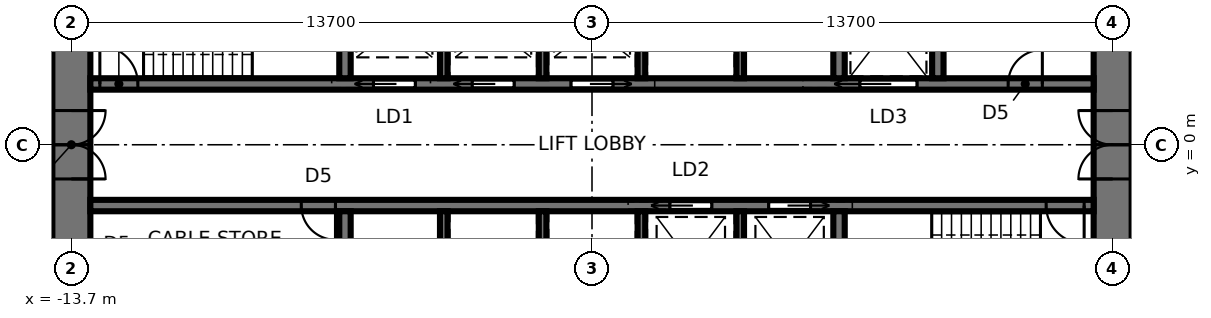
"""IFC4 building model, lengths in metres.
Left out: names, types, materials, properties, quantities, classifications, styles, units other than length and angle.
Written with IfcOpenShell. Run it as: python <this file> out.ifc"""

import sys

from ifc_helpers import new_model, si_unit, direction, frame, frame_2d, origin, place, context, subcontext, project, spatial, rectangle, extrude, element, fill, save


model = new_model("IFC4")
c1 = context("Model", 3, precision=1e-05, world=origin(), true_north=direction((0.0, 1.0)))
c2 = subcontext(c1, "Body", "Model", "MODEL_VIEW")
j1 = project(units=[si_unit("LENGTHUNIT", "METRE"), si_unit("PLANEANGLEUNIT", "RADIAN")], contexts=[c1])
p1 = place(None, origin())
s1 = spatial("IfcSite", under=j1, at=p1, CompositionType="ELEMENT")
p2 = place(p1, origin())
s2 = spatial("IfcBuilding", under=s1, at=p2, CompositionType="ELEMENT")
p3 = place(p2, frame((0.0, 0.0, 32.2)))
s3 = spatial("IfcBuildingStorey", under=s2, at=p3, CompositionType="ELEMENT", Elevation=32.2)
p4 = place(p3, frame((13.7, -9.5, 0.0), z_axis=(0.0, 0.0, 1.0), x_axis=(0.0, 1.0, 0.0)))
e1 = element("IfcWall", 1, at=p4, inside=s3, PredefinedType="SHEAR", context=c2, shape_type="SweptSolid", body=[
    extrude(rectangle(XDim=19.0, YDim=1.0, at=frame_2d((9.5, 0.0))), origin(), (0.0, 0.0, 1.0), 4.2),
])
p5 = place(p4, frame((8.6, 0.0, 0.0)))
e2 = element("IfcOpeningElement", 2, at=p5, cuts=e1, PredefinedType="OPENING", context=c2, shape_type="SweptSolid", body=[
    extrude(rectangle(XDim=1.8, YDim=2.4, at=frame_2d((0.9, 1.2))), frame((0.0, 0.51, 0.0), z_axis=(0.0, -1.0, 0.0), x_axis=(1.0, 0.0, 0.0)), (0.0, 0.0, 1.0), 1.02),
])
p6 = place(p3, frame((-13.7, 9.5, 0.0), z_axis=(0.0, 0.0, 1.0), x_axis=(0.0, -1.0, 0.0)))
e3 = element("IfcWall", 3, at=p6, inside=s3, PredefinedType="SHEAR", context=c2, shape_type="SweptSolid", body=[
    extrude(rectangle(XDim=19.0, YDim=1.0, at=frame_2d((9.5, 0.0))), origin(), (0.0, 0.0, 1.0), 4.2),
])
p7 = place(p6, frame((8.6, 0.0, 0.0)))
e4 = element("IfcOpeningElement", 4, at=p7, cuts=e3, PredefinedType="OPENING", context=c2, shape_type="SweptSolid", body=[
    extrude(rectangle(XDim=1.8, YDim=2.4, at=frame_2d((0.9, 1.2))), frame((0.0, 0.51, 0.0), z_axis=(0.0, -1.0, 0.0), x_axis=(1.0, 0.0, 0.0)), (0.0, 0.0, 1.0), 1.02),
])
p8 = place(p3, frame((-13.2, 1.6, 0.0), z_axis=(0.0, 0.0, 1.0), x_axis=(1.0, 0.0, 0.0)))
e5 = element("IfcWall", 5, at=p8, inside=s3, PredefinedType="SHEAR", context=c2, shape_type="SweptSolid", body=[
    extrude(rectangle(XDim=26.4, YDim=0.3, at=frame_2d((13.2, 0.0))), origin(), (0.0, 0.0, 1.0), 4.2),
])
p9 = place(p8, frame((0.25, 0.0, 0.0)))
e6 = element("IfcOpeningElement", 6, at=p9, cuts=e5, PredefinedType="OPENING", context=c2, shape_type="SweptSolid", body=[
    extrude(rectangle(XDim=1.0, YDim=2.1, at=frame_2d((0.5, 1.05))), frame((0.0, 0.16, 0.0), z_axis=(0.0, -1.0, 0.0), x_axis=(1.0, 0.0, 0.0)), (0.0, 0.0, 1.0), 0.32),
])
p10 = place(p8, frame((20.25, 0.0, 0.0)))
e7 = element("IfcOpeningElement", 7, at=p10, cuts=e5, PredefinedType="OPENING", context=c2, shape_type="SweptSolid", body=[
    extrude(rectangle(XDim=1.5, YDim=2.4, at=frame_2d((0.75, 1.2))), frame((0.0, 0.16, 0.0), z_axis=(0.0, -1.0, 0.0), x_axis=(1.0, 0.0, 0.0)), (0.0, 0.0, 1.0), 0.32),
])
p11 = place(p8, frame((7.45, 0.0, 0.0)))
e8 = element("IfcOpeningElement", 8, at=p11, cuts=e5, PredefinedType="OPENING", context=c2, shape_type="SweptSolid", body=[
    extrude(rectangle(XDim=1.1, YDim=2.3, at=frame_2d((0.55, 1.15))), frame((0.0, 0.16, 0.0), z_axis=(0.0, -1.0, 0.0), x_axis=(1.0, 0.0, 0.0)), (0.0, 0.0, 1.0), 0.32),
])
p12 = place(p8, frame((10.05, 0.0, 0.0)))
e9 = element("IfcOpeningElement", 9, at=p12, cuts=e5, PredefinedType="OPENING", context=c2, shape_type="SweptSolid", body=[
    extrude(rectangle(XDim=1.1, YDim=2.3, at=frame_2d((0.55, 1.15))), frame((0.0, 0.16, 0.0), z_axis=(0.0, -1.0, 0.0), x_axis=(1.0, 0.0, 0.0)), (0.0, 0.0, 1.0), 0.32),
])
p13 = place(p8, frame((12.65, 0.0, 0.0)))
e10 = element("IfcOpeningElement", 10, at=p13, cuts=e5, PredefinedType="OPENING", context=c2, shape_type="SweptSolid", body=[
    extrude(rectangle(XDim=1.1, YDim=2.3, at=frame_2d((0.55, 1.15))), frame((0.0, 0.16, 0.0), z_axis=(0.0, -1.0, 0.0), x_axis=(1.0, 0.0, 0.0)), (0.0, 0.0, 1.0), 0.32),
])
p14 = place(p8, frame((24.15, 0.0, 0.0)))
e11 = element("IfcOpeningElement", 11, at=p14, cuts=e5, PredefinedType="OPENING", context=c2, shape_type="SweptSolid", body=[
    extrude(rectangle(XDim=0.9, YDim=2.1, at=frame_2d((0.45, 1.05))), frame((0.0, 0.16, 0.0), z_axis=(0.0, -1.0, 0.0), x_axis=(1.0, 0.0, 0.0)), (0.0, 0.0, 1.0), 0.32),
])
p15 = place(p3, frame((-13.2, -1.6, 0.0), z_axis=(0.0, 0.0, 1.0), x_axis=(1.0, 0.0, 0.0)))
e12 = element("IfcWall", 12, at=p15, inside=s3, PredefinedType="SHEAR", context=c2, shape_type="SweptSolid", body=[
    extrude(rectangle(XDim=26.4, YDim=0.3, at=frame_2d((13.2, 0.0))), origin(), (0.0, 0.0, 1.0), 4.2),
])
p16 = place(p15, frame((25.15, 0.0, 0.0)))
e13 = element("IfcOpeningElement", 13, at=p16, cuts=e12, PredefinedType="OPENING", context=c2, shape_type="SweptSolid", body=[
    extrude(rectangle(XDim=1.0, YDim=2.1, at=frame_2d((0.5, 1.05))), frame((0.0, 0.16, 0.0), z_axis=(0.0, -1.0, 0.0), x_axis=(1.0, 0.0, 0.0)), (0.0, 0.0, 1.0), 0.32),
])
p17 = place(p15, frame((15.25, 0.0, 0.0)))
e14 = element("IfcOpeningElement", 14, at=p17, cuts=e12, PredefinedType="OPENING", context=c2, shape_type="SweptSolid", body=[
    extrude(rectangle(XDim=1.1, YDim=2.3, at=frame_2d((0.55, 1.15))), frame((0.0, 0.16, 0.0), z_axis=(0.0, -1.0, 0.0), x_axis=(1.0, 0.0, 0.0)), (0.0, 0.0, 1.0), 0.32),
])
p18 = place(p15, frame((17.85, 0.0, 0.0)))
e15 = element("IfcOpeningElement", 15, at=p18, cuts=e12, PredefinedType="OPENING", context=c2, shape_type="SweptSolid", body=[
    extrude(rectangle(XDim=1.1, YDim=2.3, at=frame_2d((0.55, 1.15))), frame((0.0, 0.16, 0.0), z_axis=(0.0, -1.0, 0.0), x_axis=(1.0, 0.0, 0.0)), (0.0, 0.0, 1.0), 0.32),
])
p19 = place(p15, frame((5.55, 0.0, 0.0)))
e16 = element("IfcOpeningElement", 16, at=p19, cuts=e12, PredefinedType="OPENING", context=c2, shape_type="SweptSolid", body=[
    extrude(rectangle(XDim=0.9, YDim=2.1, at=frame_2d((0.45, 1.05))), frame((0.0, 0.16, 0.0), z_axis=(0.0, -1.0, 0.0), x_axis=(1.0, 0.0, 0.0)), (0.0, 0.0, 1.0), 0.32),
])
for number, where, z_axis, x_axis in (
    (17, (-6.5, 1.75, 0.0), (0.0, 0.0, 1.0), (0.0, 1.0, 0.0)),
    (18, (6.5, 1.75, 0.0), (0.0, 0.0, 1.0), (0.0, 1.0, 0.0)),
):
    element("IfcWall", number, at=place(p3, frame(where, z_axis=z_axis, x_axis=x_axis)), inside=s3, PredefinedType="SHEAR", context=c2, shape_type="SweptSolid", body=[
        extrude(rectangle(XDim=2.7, YDim=0.3, at=frame_2d((1.35, 0.0))), origin(), (0.0, 0.0, 1.0), 4.2),
    ])
for number, where, z_axis, x_axis in (
    (19, (-3.9, 1.75, 0.0), (0.0, 0.0, 1.0), (0.0, 1.0, 0.0)),
    (20, (-1.3, 1.75, 0.0), (0.0, 0.0, 1.0), (0.0, 1.0, 0.0)),
    (21, (1.3, 1.75, 0.0), (0.0, 0.0, 1.0), (0.0, 1.0, 0.0)),
    (22, (3.9, 1.75, 0.0), (0.0, 0.0, 1.0), (0.0, 1.0, 0.0)),
):
    element("IfcWall", number, at=place(p3, frame(where, z_axis=z_axis, x_axis=x_axis)), inside=s3, PredefinedType="SHEAR", context=c2, shape_type="SweptSolid", body=[
        extrude(rectangle(XDim=2.7, YDim=0.2, at=frame_2d((1.35, 0.0))), origin(), (0.0, 0.0, 1.0), 4.2),
    ])
for number, where, z_axis, x_axis in (
    (23, (-6.5, -1.75, 0.0), (0.0, 0.0, 1.0), (0.0, -1.0, 0.0)),
    (24, (6.5, -1.75, 0.0), (0.0, 0.0, 1.0), (0.0, -1.0, 0.0)),
):
    element("IfcWall", number, at=place(p3, frame(where, z_axis=z_axis, x_axis=x_axis)), inside=s3, PredefinedType="SHEAR", context=c2, shape_type="SweptSolid", body=[
        extrude(rectangle(XDim=2.7, YDim=0.3, at=frame_2d((1.35, 0.0))), origin(), (0.0, 0.0, 1.0), 4.2),
    ])
for number, where, z_axis, x_axis in (
    (25, (-3.9, -1.75, 0.0), (0.0, 0.0, 1.0), (0.0, -1.0, 0.0)),
    (26, (-1.3, -1.75, 0.0), (0.0, 0.0, 1.0), (0.0, -1.0, 0.0)),
    (27, (1.3, -1.75, 0.0), (0.0, 0.0, 1.0), (0.0, -1.0, 0.0)),
    (28, (3.9, -1.75, 0.0), (0.0, 0.0, 1.0), (0.0, -1.0, 0.0)),
):
    element("IfcWall", number, at=place(p3, frame(where, z_axis=z_axis, x_axis=x_axis)), inside=s3, PredefinedType="SHEAR", context=c2, shape_type="SweptSolid", body=[
        extrude(rectangle(XDim=2.7, YDim=0.2, at=frame_2d((1.35, 0.0))), origin(), (0.0, 0.0, 1.0), 4.2),
    ])
p20 = place(p3, frame((9.1, 1.75, 0.0), z_axis=(0.0, 0.0, 1.0), x_axis=(0.0, 1.0, 0.0)))
e29 = element("IfcWall", 29, at=p20, inside=s3, PredefinedType="SHEAR", context=c2, shape_type="SweptSolid", body=[
    extrude(rectangle(XDim=2.7, YDim=0.3, at=frame_2d((1.35, 0.0))), origin(), (0.0, 0.0, 1.0), 4.2),
])
p21 = place(p7, origin())
e30 = element("IfcDoor", 30, at=p21, inside=s3, OperationType="DOUBLE_DOOR_SINGLE_SWING", PredefinedType="DOOR", context=c2, shape_type="SweptSolid", body=[
    extrude(rectangle(XDim=1.72, YDim=2.36, at=frame_2d((0.9, 1.18))), frame((0.0, 0.025, 0.0), z_axis=(0.0, -1.0, 0.0), x_axis=(1.0, 0.0, 0.0)), (0.0, 0.0, 1.0), 0.05),
    extrude(rectangle(XDim=0.04, YDim=2.4, at=frame_2d((0.02, 1.2))), frame((0.0, 0.25, 0.0), z_axis=(0.0, -1.0, 0.0), x_axis=(1.0, 0.0, 0.0)), (0.0, 0.0, 1.0), 0.5),
    extrude(rectangle(XDim=0.04, YDim=2.4, at=frame_2d((1.78, 1.2))), frame((0.0, 0.25, 0.0), z_axis=(0.0, -1.0, 0.0), x_axis=(1.0, 0.0, 0.0)), (0.0, 0.0, 1.0), 0.5),
    extrude(rectangle(XDim=1.72, YDim=0.04, at=frame_2d((0.9, 2.38))), frame((0.0, 0.25, 0.0), z_axis=(0.0, -1.0, 0.0), x_axis=(1.0, 0.0, 0.0)), (0.0, 0.0, 1.0), 0.5),
])
fill(e4, e30)
p22 = place(p5, origin())
e31 = element("IfcDoor", 31, at=p22, inside=s3, OperationType="DOUBLE_DOOR_SINGLE_SWING", PredefinedType="DOOR", context=c2, shape_type="SweptSolid", body=[
    extrude(rectangle(XDim=1.72, YDim=2.36, at=frame_2d((0.9, 1.18))), frame((0.0, 0.025, 0.0), z_axis=(0.0, -1.0, 0.0), x_axis=(1.0, 0.0, 0.0)), (0.0, 0.0, 1.0), 0.05),
    extrude(rectangle(XDim=0.04, YDim=2.4, at=frame_2d((0.02, 1.2))), frame((0.0, 0.25, 0.0), z_axis=(0.0, -1.0, 0.0), x_axis=(1.0, 0.0, 0.0)), (0.0, 0.0, 1.0), 0.5),
    extrude(rectangle(XDim=0.04, YDim=2.4, at=frame_2d((1.78, 1.2))), frame((0.0, 0.25, 0.0), z_axis=(0.0, -1.0, 0.0), x_axis=(1.0, 0.0, 0.0)), (0.0, 0.0, 1.0), 0.5),
    extrude(rectangle(XDim=1.72, YDim=0.04, at=frame_2d((0.9, 2.38))), frame((0.0, 0.25, 0.0), z_axis=(0.0, -1.0, 0.0), x_axis=(1.0, 0.0, 0.0)), (0.0, 0.0, 1.0), 0.5),
])
fill(e2, e31)
p23 = place(p9, origin())
e32 = element("IfcDoor", 32, at=p23, inside=s3, OperationType="SINGLE_SWING_LEFT", PredefinedType="DOOR", context=c2, shape_type="SweptSolid", body=[
    extrude(rectangle(XDim=1.0, YDim=2.1, at=frame_2d((0.5, 1.05))), frame((0.0, 0.025, 0.0), z_axis=(0.0, -1.0, 0.0), x_axis=(1.0, 0.0, 0.0)), (0.0, 0.0, 1.0), 0.05),
])
fill(e6, e32)
p24 = place(p16, frame((1.0, 0.0, 0.0), z_axis=(0.0, 0.0, 1.0), x_axis=(-1.0, 0.0, 0.0)))
e33 = element("IfcDoor", 33, at=p24, inside=s3, OperationType="SINGLE_SWING_LEFT", PredefinedType="DOOR", context=c2, shape_type="SweptSolid", body=[
    extrude(rectangle(XDim=1.0, YDim=2.1, at=frame_2d((0.5, 1.05))), frame((0.0, 0.025, 0.0), z_axis=(0.0, -1.0, 0.0), x_axis=(1.0, 0.0, 0.0)), (0.0, 0.0, 1.0), 0.05),
])
fill(e13, e33)
p25 = place(p10, origin())
e34 = element("IfcDoor", 34, at=p25, inside=s3, OperationType="SLIDING_TO_LEFT", PredefinedType="DOOR", context=c2, shape_type="SweptSolid", body=[
    extrude(rectangle(XDim=1.5, YDim=2.4, at=frame_2d((0.75, 1.2))), frame((0.0, 0.025, 0.0), z_axis=(0.0, -1.0, 0.0), x_axis=(1.0, 0.0, 0.0)), (0.0, 0.0, 1.0), 0.05),
])
fill(e7, e34)
p26 = place(p11, origin())
e35 = element("IfcDoor", 35, at=p26, inside=s3, OperationType="SLIDING_TO_LEFT", PredefinedType="DOOR", context=c2, shape_type="SweptSolid", body=[
    extrude(rectangle(XDim=1.1, YDim=2.3, at=frame_2d((0.55, 1.15))), frame((0.0, 0.025, 0.0), z_axis=(0.0, -1.0, 0.0), x_axis=(1.0, 0.0, 0.0)), (0.0, 0.0, 1.0), 0.05),
])
fill(e8, e35)
p27 = place(p12, origin())
e36 = element("IfcDoor", 36, at=p27, inside=s3, OperationType="SLIDING_TO_LEFT", PredefinedType="DOOR", context=c2, shape_type="SweptSolid", body=[
    extrude(rectangle(XDim=1.1, YDim=2.3, at=frame_2d((0.55, 1.15))), frame((0.0, 0.025, 0.0), z_axis=(0.0, -1.0, 0.0), x_axis=(1.0, 0.0, 0.0)), (0.0, 0.0, 1.0), 0.05),
])
fill(e9, e36)
p28 = place(p13, origin())
e37 = element("IfcDoor", 37, at=p28, inside=s3, OperationType="SLIDING_TO_RIGHT", PredefinedType="DOOR", context=c2, shape_type="SweptSolid", body=[
    extrude(rectangle(XDim=1.1, YDim=2.3, at=frame_2d((0.55, 1.15))), frame((0.0, 0.025, 0.0), z_axis=(0.0, -1.0, 0.0), x_axis=(1.0, 0.0, 0.0)), (0.0, 0.0, 1.0), 0.05),
])
fill(e10, e37)
p29 = place(p17, frame((1.1, 0.0, 0.0), z_axis=(0.0, 0.0, 1.0), x_axis=(-1.0, 0.0, 0.0)))
e38 = element("IfcDoor", 38, at=p29, inside=s3, OperationType="SLIDING_TO_RIGHT", PredefinedType="DOOR", context=c2, shape_type="SweptSolid", body=[
    extrude(rectangle(XDim=1.1, YDim=2.3, at=frame_2d((0.55, 1.15))), frame((0.0, 0.025, 0.0), z_axis=(0.0, -1.0, 0.0), x_axis=(1.0, 0.0, 0.0)), (0.0, 0.0, 1.0), 0.05),
])
fill(e14, e38)
p30 = place(p18, frame((1.1, 0.0, 0.0), z_axis=(0.0, 0.0, 1.0), x_axis=(-1.0, 0.0, 0.0)))
e39 = element("IfcDoor", 39, at=p30, inside=s3, OperationType="SLIDING_TO_LEFT", PredefinedType="DOOR", context=c2, shape_type="SweptSolid", body=[
    extrude(rectangle(XDim=1.1, YDim=2.3, at=frame_2d((0.55, 1.15))), frame((0.0, 0.025, 0.0), z_axis=(0.0, -1.0, 0.0), x_axis=(1.0, 0.0, 0.0)), (0.0, 0.0, 1.0), 0.05),
])
fill(e15, e39)
p31 = place(p14, origin())
e40 = element("IfcDoor", 40, at=p31, inside=s3, OperationType="SINGLE_SWING_RIGHT", PredefinedType="DOOR", context=c2, shape_type="SweptSolid", body=[
    extrude(rectangle(XDim=0.9, YDim=2.1, at=frame_2d((0.45, 1.05))), frame((0.0, 0.025, 0.0), z_axis=(0.0, -1.0, 0.0), x_axis=(1.0, 0.0, 0.0)), (0.0, 0.0, 1.0), 0.05),
])
fill(e11, e40)
p32 = place(p19, frame((0.9, 0.0, 0.0), z_axis=(0.0, 0.0, 1.0), x_axis=(-1.0, 0.0, 0.0)))
e41 = element("IfcDoor", 41, at=p32, inside=s3, OperationType="SINGLE_SWING_LEFT", PredefinedType="DOOR", context=c2, shape_type="SweptSolid", body=[
    extrude(rectangle(XDim=0.9, YDim=2.1, at=frame_2d((0.45, 1.05))), frame((0.0, 0.025, 0.0), z_axis=(0.0, -1.0, 0.0), x_axis=(1.0, 0.0, 0.0)), (0.0, 0.0, 1.0), 0.05),
])
fill(e16, e41)
save(model, sys.argv[1])
